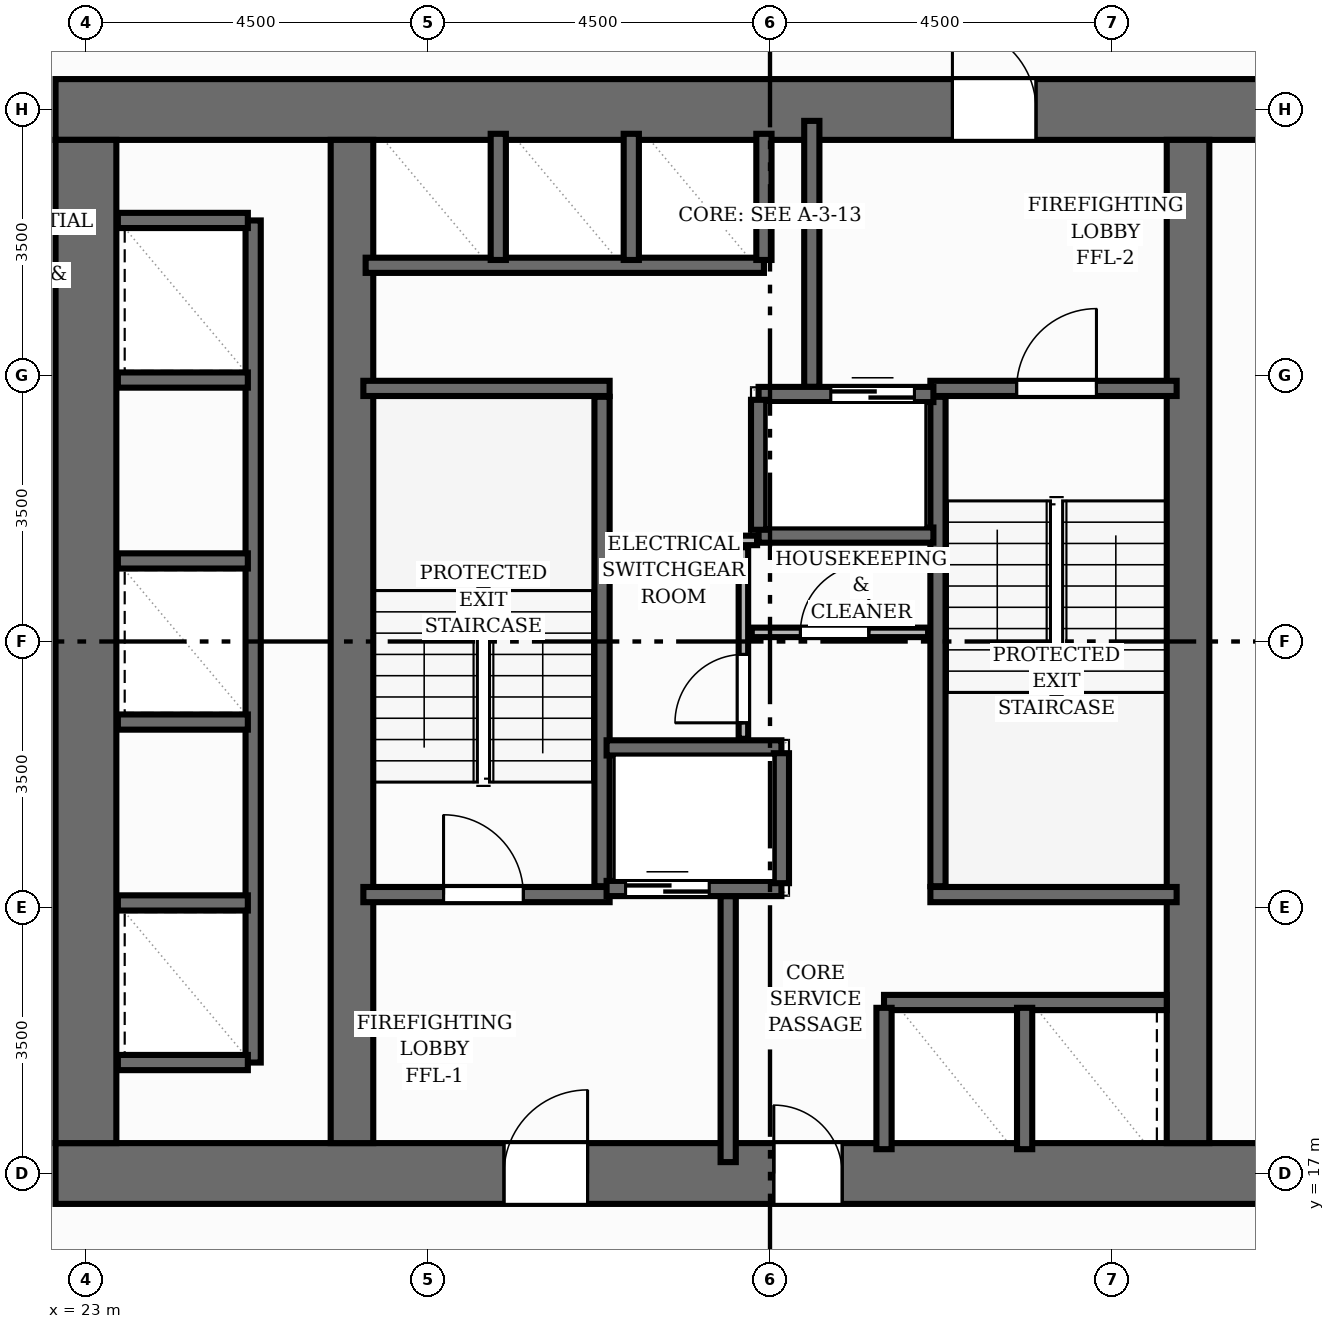
"""IFC4 building model, lengths in metres.
Left out: names, types, materials, properties, quantities, classifications, styles, units other than length and angle.
Written with IfcOpenShell. Run it as: python <this file> out.ifc"""

import sys

from ifc_helpers import new_model, si_unit, direction, frame, frame_2d, origin, place, context, subcontext, project, spatial, rectangle, extrude, element, fill, save


model = new_model("IFC4")
c1 = context("Model", 3, precision=1e-05, world=origin(), true_north=direction((0.0, 1.0)))
c2 = subcontext(c1, "Body", "Model", "MODEL_VIEW")
j1 = project(units=[si_unit("LENGTHUNIT", "METRE"), si_unit("PLANEANGLEUNIT", "RADIAN")], contexts=[c1])
p1 = place(None, origin())
s1 = spatial("IfcSite", under=j1, at=p1, CompositionType="ELEMENT")
p2 = place(p1, origin())
s2 = spatial("IfcBuilding", under=s1, at=p2, CompositionType="ELEMENT")
p3 = place(p2, frame((0.0, 0.0, 50.4)))
s3 = spatial("IfcBuildingStorey", under=s2, at=p3, CompositionType="ELEMENT", Elevation=50.4)
p4 = place(p3, frame((22.6, 17.0, 0.0), z_axis=(0.0, 0.0, 1.0), x_axis=(1.0, 0.0, 0.0)))
e1 = element("IfcWall", 1, at=p4, inside=s3, PredefinedType="SHEAR", context=c2, shape_type="SweptSolid", body=[
    extrude(rectangle(XDim=18.8, YDim=0.8, at=frame_2d((9.4, 0.0))), origin(), (0.0, 0.0, 1.0), 3.2),
])
p5 = place(p4, frame((5.9, 0.0, 0.0)))
e2 = element("IfcOpeningElement", 2, at=p5, cuts=e1, PredefinedType="OPENING", context=c2, shape_type="SweptSolid", body=[
    extrude(rectangle(XDim=1.1, YDim=2.15, at=frame_2d((0.55, 1.075))), frame((0.0, 0.41, 0.0), z_axis=(0.0, -1.0, 0.0), x_axis=(1.0, 0.0, 0.0)), (0.0, 0.0, 1.0), 0.82),
])
p6 = place(p4, frame((9.45, 0.0, 0.0)))
e3 = element("IfcOpeningElement", 3, at=p6, cuts=e1, PredefinedType="OPENING", context=c2, shape_type="SweptSolid", body=[
    extrude(rectangle(XDim=0.9, YDim=2.1, at=frame_2d((0.45, 1.05))), frame((0.0, 0.41, 0.0), z_axis=(0.0, -1.0, 0.0), x_axis=(1.0, 0.0, 0.0)), (0.0, 0.0, 1.0), 0.82),
])
p7 = place(p3, frame((22.6, 31.0, 0.0), z_axis=(0.0, 0.0, 1.0), x_axis=(1.0, 0.0, 0.0)))
e4 = element("IfcWall", 4, at=p7, inside=s3, PredefinedType="SHEAR", context=c2, shape_type="SweptSolid", body=[
    extrude(rectangle(XDim=18.8, YDim=0.8, at=frame_2d((9.4, 0.0))), origin(), (0.0, 0.0, 1.0), 3.2),
])
p8 = place(p7, frame((11.8, 0.0, 0.0)))
e5 = element("IfcOpeningElement", 5, at=p8, cuts=e4, PredefinedType="OPENING", context=c2, shape_type="SweptSolid", body=[
    extrude(rectangle(XDim=1.1, YDim=2.15, at=frame_2d((0.55, 1.075))), frame((0.0, 0.41, 0.0), z_axis=(0.0, -1.0, 0.0), x_axis=(1.0, 0.0, 0.0)), (0.0, 0.0, 1.0), 0.82),
])
p9 = place(p3, frame((23.0, 17.4, 0.0), z_axis=(0.0, 0.0, 1.0), x_axis=(0.0, 1.0, 0.0)))
e6 = element("IfcWall", 6, at=p9, inside=s3, PredefinedType="SHEAR", context=c2, shape_type="SweptSolid", body=[
    extrude(rectangle(XDim=13.2, YDim=0.8, at=frame_2d((6.6, 0.0))), origin(), (0.0, 0.0, 1.0), 3.2),
])
for number, where, z_axis, x_axis in (
    (7, (26.5, 17.4, 0.0), (0.0, 0.0, 1.0), (0.0, 1.0, 0.0)),
    (8, (37.5, 17.4, 0.0), (0.0, 0.0, 1.0), (0.0, 1.0, 0.0)),
):
    element("IfcWall", number, at=place(p3, frame(where, z_axis=z_axis, x_axis=x_axis)), inside=s3, PredefinedType="SHEAR", context=c2, shape_type="SweptSolid", body=[
        extrude(rectangle(XDim=13.2, YDim=0.56, at=frame_2d((6.6, 0.0))), origin(), (0.0, 0.0, 1.0), 3.2),
    ])
p10 = place(p3, frame((29.79, 20.78, 0.0), z_axis=(0.0, 0.0, 1.0), x_axis=(0.0, 1.0, 0.0)))
e9 = element("IfcWall", 9, at=p10, inside=s3, PredefinedType="SHEAR", context=c2, shape_type="SweptSolid", body=[
    extrude(rectangle(XDim=6.44, YDim=0.2, at=frame_2d((3.22, 0.0))), origin(), (0.0, 0.0, 1.0), 3.2),
])
p11 = place(p3, frame((26.65, 27.33, 0.0), z_axis=(0.0, 0.0, 1.0), x_axis=(1.0, 0.0, 0.0)))
e10 = element("IfcWall", 10, at=p11, inside=s3, PredefinedType="SHEAR", context=c2, shape_type="SweptSolid", body=[
    extrude(rectangle(XDim=3.24, YDim=0.2, at=frame_2d((1.62, 0.0))), origin(), (0.0, 0.0, 1.0), 3.2),
])
p12 = place(p3, frame((26.65, 20.67, 0.0), z_axis=(0.0, 0.0, 1.0), x_axis=(1.0, 0.0, 0.0)))
e11 = element("IfcWall", 11, at=p12, inside=s3, PredefinedType="SHEAR", context=c2, shape_type="SweptSolid", body=[
    extrude(rectangle(XDim=3.24, YDim=0.2, at=frame_2d((1.62, 0.0))), origin(), (0.0, 0.0, 1.0), 3.2),
])
p13 = place(p12, frame((1.055, 0.0, 0.0)))
e12 = element("IfcOpeningElement", 12, at=p13, cuts=e11, PredefinedType="OPENING", context=c2, shape_type="SweptSolid", body=[
    extrude(rectangle(XDim=1.05, YDim=2.15, at=frame_2d((0.525, 1.075))), frame((0.0, 0.11, 0.0), z_axis=(0.0, -1.0, 0.0), x_axis=(1.0, 0.0, 0.0)), (0.0, 0.0, 1.0), 0.22),
])
p14 = place(p3, frame((34.21, 20.78, 0.0), z_axis=(0.0, 0.0, 1.0), x_axis=(0.0, 1.0, 0.0)))
e13 = element("IfcWall", 13, at=p14, inside=s3, PredefinedType="SHEAR", context=c2, shape_type="SweptSolid", body=[
    extrude(rectangle(XDim=6.44, YDim=0.2, at=frame_2d((3.22, 0.0))), origin(), (0.0, 0.0, 1.0), 3.2),
])
p15 = place(p3, frame((34.11, 20.67, 0.0), z_axis=(0.0, 0.0, 1.0), x_axis=(1.0, 0.0, 0.0)))
e14 = element("IfcWall", 14, at=p15, inside=s3, PredefinedType="SHEAR", context=c2, shape_type="SweptSolid", body=[
    extrude(rectangle(XDim=3.24, YDim=0.2, at=frame_2d((1.62, 0.0))), origin(), (0.0, 0.0, 1.0), 3.2),
])
p16 = place(p3, frame((34.11, 27.33, 0.0), z_axis=(0.0, 0.0, 1.0), x_axis=(1.0, 0.0, 0.0)))
e15 = element("IfcWall", 15, at=p16, inside=s3, PredefinedType="SHEAR", context=c2, shape_type="SweptSolid", body=[
    extrude(rectangle(XDim=3.24, YDim=0.2, at=frame_2d((1.62, 0.0))), origin(), (0.0, 0.0, 1.0), 3.2),
])
p17 = place(p16, frame((1.135, 0.0, 0.0)))
e16 = element("IfcOpeningElement", 16, at=p17, cuts=e15, PredefinedType="OPENING", context=c2, shape_type="SweptSolid", body=[
    extrude(rectangle(XDim=1.05, YDim=2.15, at=frame_2d((0.525, 1.075))), frame((0.0, 0.11, 0.0), z_axis=(0.0, -1.0, 0.0), x_axis=(1.0, 0.0, 0.0)), (0.0, 0.0, 1.0), 0.22),
])
for number, where, z_axis, x_axis in (
    (17, (31.45, 17.15, 0.0), (0.0, 0.0, 1.0), (0.0, 1.0, 0.0)),
    (18, (32.55, 27.35, 0.0), (0.0, 0.0, 1.0), (0.0, 1.0, 0.0)),
):
    element("IfcWall", number, at=place(p3, frame(where, z_axis=z_axis, x_axis=x_axis)), inside=s3, PredefinedType="SHEAR", context=c2, shape_type="SweptSolid", body=[
        extrude(rectangle(XDim=3.5, YDim=0.2, at=frame_2d((1.75, 0.0))), origin(), (0.0, 0.0, 1.0), 3.2),
    ])
p18 = place(p3, frame((29.85, 20.75, 0.0), z_axis=(0.0, 0.0, 1.0), x_axis=(1.0, 0.0, 0.0)))
e19 = element("IfcWall", 19, at=p18, inside=s3, PredefinedType="SHEAR", context=c2, shape_type="SweptSolid", body=[
    extrude(rectangle(XDim=2.3, YDim=0.2, at=frame_2d((1.15, 0.0))), origin(), (0.0, 0.0, 1.0), 3.2),
])
p19 = place(p18, frame((0.25, 0.0, 0.0)))
e20 = element("IfcOpeningElement", 20, at=p19, cuts=e19, PredefinedType="OPENING", context=c2, shape_type="SweptSolid", body=[
    extrude(rectangle(XDim=1.1, YDim=2.15, at=frame_2d((0.55, 1.075))), frame((0.0, 0.11, 0.0), z_axis=(0.0, -1.0, 0.0), x_axis=(1.0, 0.0, 0.0)), (0.0, 0.0, 1.0), 0.22),
])
p20 = place(p3, frame((29.85, 22.6, 0.0), z_axis=(0.0, 0.0, 1.0), x_axis=(1.0, 0.0, 0.0)))
e21 = element("IfcWall", 21, at=p20, inside=s3, PredefinedType="SHEAR", context=c2, shape_type="SweptSolid", body=[
    extrude(rectangle(XDim=2.3, YDim=0.2, at=frame_2d((1.15, 0.0))), origin(), (0.0, 0.0, 1.0), 3.2),
])
p21 = place(p3, frame((32.15, 20.82, 0.0), z_axis=(0.0, 0.0, 1.0), x_axis=(0.0, 1.0, 0.0)))
e22 = element("IfcWall", 22, at=p21, inside=s3, PredefinedType="SHEAR", context=c2, shape_type="SweptSolid", body=[
    extrude(rectangle(XDim=1.71, YDim=0.2, at=frame_2d((0.855, 0.0))), origin(), (0.0, 0.0, 1.0), 3.2),
])
p22 = place(p3, frame((31.85, 27.25, 0.0), z_axis=(0.0, 0.0, 1.0), x_axis=(1.0, 0.0, 0.0)))
e23 = element("IfcWall", 23, at=p22, inside=s3, PredefinedType="SHEAR", context=c2, shape_type="SweptSolid", body=[
    extrude(rectangle(XDim=2.3, YDim=0.2, at=frame_2d((1.15, 0.0))), origin(), (0.0, 0.0, 1.0), 3.2),
])
p23 = place(p22, frame((0.95, 0.0, 0.0)))
e24 = element("IfcOpeningElement", 24, at=p23, cuts=e23, PredefinedType="OPENING", context=c2, shape_type="SweptSolid", body=[
    extrude(rectangle(XDim=1.1, YDim=2.15, at=frame_2d((0.55, 1.075))), frame((0.0, 0.11, 0.0), z_axis=(0.0, -1.0, 0.0), x_axis=(1.0, 0.0, 0.0)), (0.0, 0.0, 1.0), 0.22),
])
p24 = place(p3, frame((31.85, 25.4, 0.0), z_axis=(0.0, 0.0, 1.0), x_axis=(1.0, 0.0, 0.0)))
e25 = element("IfcWall", 25, at=p24, inside=s3, PredefinedType="SHEAR", context=c2, shape_type="SweptSolid", body=[
    extrude(rectangle(XDim=2.3, YDim=0.2, at=frame_2d((1.15, 0.0))), origin(), (0.0, 0.0, 1.0), 3.2),
])
p25 = place(p3, frame((31.85, 25.47, 0.0), z_axis=(0.0, 0.0, 1.0), x_axis=(0.0, 1.0, 0.0)))
e26 = element("IfcWall", 26, at=p25, inside=s3, PredefinedType="SHEAR", context=c2, shape_type="SweptSolid", body=[
    extrude(rectangle(XDim=1.71, YDim=0.2, at=frame_2d((0.855, 0.0))), origin(), (0.0, 0.0, 1.0), 3.2),
])
p26 = place(p3, frame((25.2, 18.46, 0.0), z_axis=(0.0, 0.0, 1.0), x_axis=(0.0, 1.0, 0.0)))
e27 = element("IfcWall", 27, at=p26, inside=s3, PredefinedType="SHEAR", context=c2, shape_type="SweptSolid", body=[
    extrude(rectangle(XDim=11.08, YDim=0.2, at=frame_2d((5.54, 0.0))), origin(), (0.0, 0.0, 1.0), 3.2),
])
for number, where, z_axis, x_axis in (
    (28, (23.42, 18.46, 0.0), (0.0, 0.0, 1.0), (1.0, 0.0, 0.0)),
    (29, (23.42, 29.54, 0.0), (0.0, 0.0, 1.0), (1.0, 0.0, 0.0)),
    (30, (23.42, 20.56, 0.0), (0.0, 0.0, 1.0), (1.0, 0.0, 0.0)),
    (31, (23.42, 22.94, 0.0), (0.0, 0.0, 1.0), (1.0, 0.0, 0.0)),
    (32, (23.42, 25.06, 0.0), (0.0, 0.0, 1.0), (1.0, 0.0, 0.0)),
    (33, (23.42, 27.44, 0.0), (0.0, 0.0, 1.0), (1.0, 0.0, 0.0)),
):
    element("IfcWall", number, at=place(p3, frame(where, z_axis=z_axis, x_axis=x_axis)), inside=s3, PredefinedType="SHEAR", context=c2, shape_type="SweptSolid", body=[
        extrude(rectangle(XDim=1.71, YDim=0.2, at=frame_2d((0.855, 0.0))), origin(), (0.0, 0.0, 1.0), 3.2),
    ])
p27 = place(p3, frame((26.68, 28.95, 0.0), z_axis=(0.0, 0.0, 1.0), x_axis=(1.0, 0.0, 0.0)))
e34 = element("IfcWall", 34, at=p27, inside=s3, PredefinedType="SHEAR", context=c2, shape_type="SweptSolid", body=[
    extrude(rectangle(XDim=5.24, YDim=0.2, at=frame_2d((2.62, 0.0))), origin(), (0.0, 0.0, 1.0), 3.2),
])
for number, where, z_axis, x_axis in (
    (35, (31.92, 29.02, 0.0), (0.0, 0.0, 1.0), (0.0, 1.0, 0.0)),
    (36, (28.425, 29.02, 0.0), (0.0, 0.0, 1.0), (0.0, 1.0, 0.0)),
    (37, (30.175, 29.02, 0.0), (0.0, 0.0, 1.0), (0.0, 1.0, 0.0)),
):
    element("IfcWall", number, at=place(p3, frame(where, z_axis=z_axis, x_axis=x_axis)), inside=s3, PredefinedType="SHEAR", context=c2, shape_type="SweptSolid", body=[
        extrude(rectangle(XDim=1.66, YDim=0.2, at=frame_2d((0.83, 0.0))), origin(), (0.0, 0.0, 1.0), 3.2),
    ])
p28 = place(p3, frame((33.5, 19.25, 0.0), z_axis=(0.0, 0.0, 1.0), x_axis=(1.0, 0.0, 0.0)))
e38 = element("IfcWall", 38, at=p28, inside=s3, PredefinedType="SHEAR", context=c2, shape_type="SweptSolid", body=[
    extrude(rectangle(XDim=3.72, YDim=0.2, at=frame_2d((1.86, 0.0))), origin(), (0.0, 0.0, 1.0), 3.2),
])
for number, where, z_axis, x_axis in (
    (39, (33.5, 17.32, 0.0), (0.0, 0.0, 1.0), (0.0, 1.0, 0.0)),
    (40, (35.35, 17.32, 0.0), (0.0, 0.0, 1.0), (0.0, 1.0, 0.0)),
):
    element("IfcWall", number, at=place(p3, frame(where, z_axis=z_axis, x_axis=x_axis)), inside=s3, PredefinedType="SHEAR", context=c2, shape_type="SweptSolid", body=[
        extrude(rectangle(XDim=1.86, YDim=0.2, at=frame_2d((0.93, 0.0))), origin(), (0.0, 0.0, 1.0), 3.2),
    ])
p29 = place(p3, frame((31.65, 22.72, 0.0), z_axis=(0.0, 0.0, 1.0), x_axis=(0.0, 1.0, 0.0)))
e41 = element("IfcWall", 41, at=p29, inside=s3, PredefinedType="PARTITIONING", context=c2, shape_type="SweptSolid", body=[
    extrude(rectangle(XDim=2.52, YDim=0.125, at=frame_2d((1.26, 0.0))), origin(), (0.0, 0.0, 1.0), 2.955),
])
p30 = place(p29, frame((0.21, 0.0, 0.0)))
e42 = element("IfcOpeningElement", 42, at=p30, cuts=e41, PredefinedType="OPENING", context=c2, shape_type="SweptSolid", body=[
    extrude(rectangle(XDim=0.9, YDim=2.1, at=frame_2d((0.45, 1.05))), frame((0.0, 0.073, 0.0), z_axis=(0.0, -1.0, 0.0), x_axis=(1.0, 0.0, 0.0)), (0.0, 0.0, 1.0), 0.145),
])
p31 = place(p3, frame((31.76, 24.12, 0.0), z_axis=(0.0, 0.0, 1.0), x_axis=(1.0, 0.0, 0.0)))
e43 = element("IfcWall", 43, at=p31, inside=s3, PredefinedType="PARTITIONING", context=c2, shape_type="SweptSolid", body=[
    extrude(rectangle(XDim=2.32, YDim=0.125, at=frame_2d((1.16, 0.0))), origin(), (0.0, 0.0, 1.0), 2.955),
])
p32 = place(p31, frame((0.64, 0.0, 0.0)))
e44 = element("IfcOpeningElement", 44, at=p32, cuts=e43, PredefinedType="OPENING", context=c2, shape_type="SweptSolid", body=[
    extrude(rectangle(XDim=0.9, YDim=2.1, at=frame_2d((0.45, 1.05))), frame((0.0, 0.073, 0.0), z_axis=(0.0, -1.0, 0.0), x_axis=(1.0, 0.0, 0.0)), (0.0, 0.0, 1.0), 0.145),
])
p33 = place(p3, frame((29.89, 25.33, 0.0), z_axis=(0.0, 0.0, 1.0), x_axis=(1.0, 0.0, 0.0)))
e45 = element("IfcWall", 45, at=p33, inside=s3, PredefinedType="PARTITIONING", context=c2, shape_type="SweptSolid", body=[
    extrude(rectangle(XDim=1.94, YDim=0.125, at=frame_2d((0.97, 0.0))), origin(), (0.0, 0.0, 1.0), 2.955),
])
p34 = place(p13, origin())
e46 = element("IfcDoor", 46, at=p34, inside=s3, OperationType="SINGLE_SWING_LEFT", PredefinedType="DOOR", context=c2, shape_type="SweptSolid", body=[
    extrude(rectangle(XDim=1.05, YDim=2.15, at=frame_2d((0.525, 1.075))), frame((0.0, 0.025, 0.0), z_axis=(0.0, -1.0, 0.0), x_axis=(1.0, 0.0, 0.0)), (0.0, 0.0, 1.0), 0.05),
])
fill(e12, e46)
p35 = place(p17, origin())
e47 = element("IfcDoor", 47, at=p35, inside=s3, OperationType="SINGLE_SWING_RIGHT", PredefinedType="DOOR", context=c2, shape_type="SweptSolid", body=[
    extrude(rectangle(XDim=1.05, YDim=2.15, at=frame_2d((0.525, 1.075))), frame((0.0, 0.025, 0.0), z_axis=(0.0, -1.0, 0.0), x_axis=(1.0, 0.0, 0.0)), (0.0, 0.0, 1.0), 0.05),
])
fill(e16, e47)
p36 = place(p5, origin())
e48 = element("IfcDoor", 48, at=p36, inside=s3, OperationType="SINGLE_SWING_RIGHT", PredefinedType="DOOR", context=c2, shape_type="SweptSolid", body=[
    extrude(rectangle(XDim=1.1, YDim=2.15, at=frame_2d((0.55, 1.075))), frame((0.0, 0.025, 0.0), z_axis=(0.0, -1.0, 0.0), x_axis=(1.0, 0.0, 0.0)), (0.0, 0.0, 1.0), 0.05),
])
fill(e2, e48)
p37 = place(p8, origin())
e49 = element("IfcDoor", 49, at=p37, inside=s3, OperationType="SINGLE_SWING_LEFT", PredefinedType="DOOR", context=c2, shape_type="SweptSolid", body=[
    extrude(rectangle(XDim=1.1, YDim=2.15, at=frame_2d((0.55, 1.075))), frame((0.0, 0.025, 0.0), z_axis=(0.0, -1.0, 0.0), x_axis=(1.0, 0.0, 0.0)), (0.0, 0.0, 1.0), 0.05),
])
fill(e5, e49)
p38 = place(p19, origin())
e50 = element("IfcDoor", 50, at=p38, inside=s3, OperationType="DOUBLE_DOOR_SLIDING", PredefinedType="DOOR", context=c2, shape_type="SweptSolid", body=[
    extrude(rectangle(XDim=1.1, YDim=2.15, at=frame_2d((0.55, 1.075))), frame((0.0, 0.025, 0.0), z_axis=(0.0, -1.0, 0.0), x_axis=(1.0, 0.0, 0.0)), (0.0, 0.0, 1.0), 0.05),
])
fill(e20, e50)
p39 = place(p23, origin())
e51 = element("IfcDoor", 51, at=p39, inside=s3, OperationType="DOUBLE_DOOR_SLIDING", PredefinedType="DOOR", context=c2, shape_type="SweptSolid", body=[
    extrude(rectangle(XDim=1.1, YDim=2.15, at=frame_2d((0.55, 1.075))), frame((0.0, 0.025, 0.0), z_axis=(0.0, -1.0, 0.0), x_axis=(1.0, 0.0, 0.0)), (0.0, 0.0, 1.0), 0.05),
])
fill(e24, e51)
p40 = place(p6, origin())
e52 = element("IfcDoor", 52, at=p40, inside=s3, OperationType="SINGLE_SWING_LEFT", PredefinedType="DOOR", context=c2, shape_type="SweptSolid", body=[
    extrude(rectangle(XDim=0.9, YDim=2.1, at=frame_2d((0.45, 1.05))), frame((0.0, 0.025, 0.0), z_axis=(0.0, -1.0, 0.0), x_axis=(1.0, 0.0, 0.0)), (0.0, 0.0, 1.0), 0.05),
])
fill(e3, e52)
p41 = place(p30, origin())
e53 = element("IfcDoor", 53, at=p41, inside=s3, OperationType="SINGLE_SWING_LEFT", PredefinedType="DOOR", context=c2, shape_type="SweptSolid", body=[
    extrude(rectangle(XDim=0.9, YDim=2.1, at=frame_2d((0.45, 1.05))), frame((0.0, 0.025, 0.0), z_axis=(0.0, -1.0, 0.0), x_axis=(1.0, 0.0, 0.0)), (0.0, 0.0, 1.0), 0.05),
])
fill(e42, e53)
p42 = place(p32, origin())
e54 = element("IfcDoor", 54, at=p42, inside=s3, OperationType="SINGLE_SWING_RIGHT", PredefinedType="DOOR", context=c2, shape_type="SweptSolid", body=[
    extrude(rectangle(XDim=0.9, YDim=2.1, at=frame_2d((0.45, 1.05))), frame((0.0, 0.025, 0.0), z_axis=(0.0, -1.0, 0.0), x_axis=(1.0, 0.0, 0.0)), (0.0, 0.0, 1.0), 0.05),
])
fill(e44, e54)
save(model, sys.argv[1])
